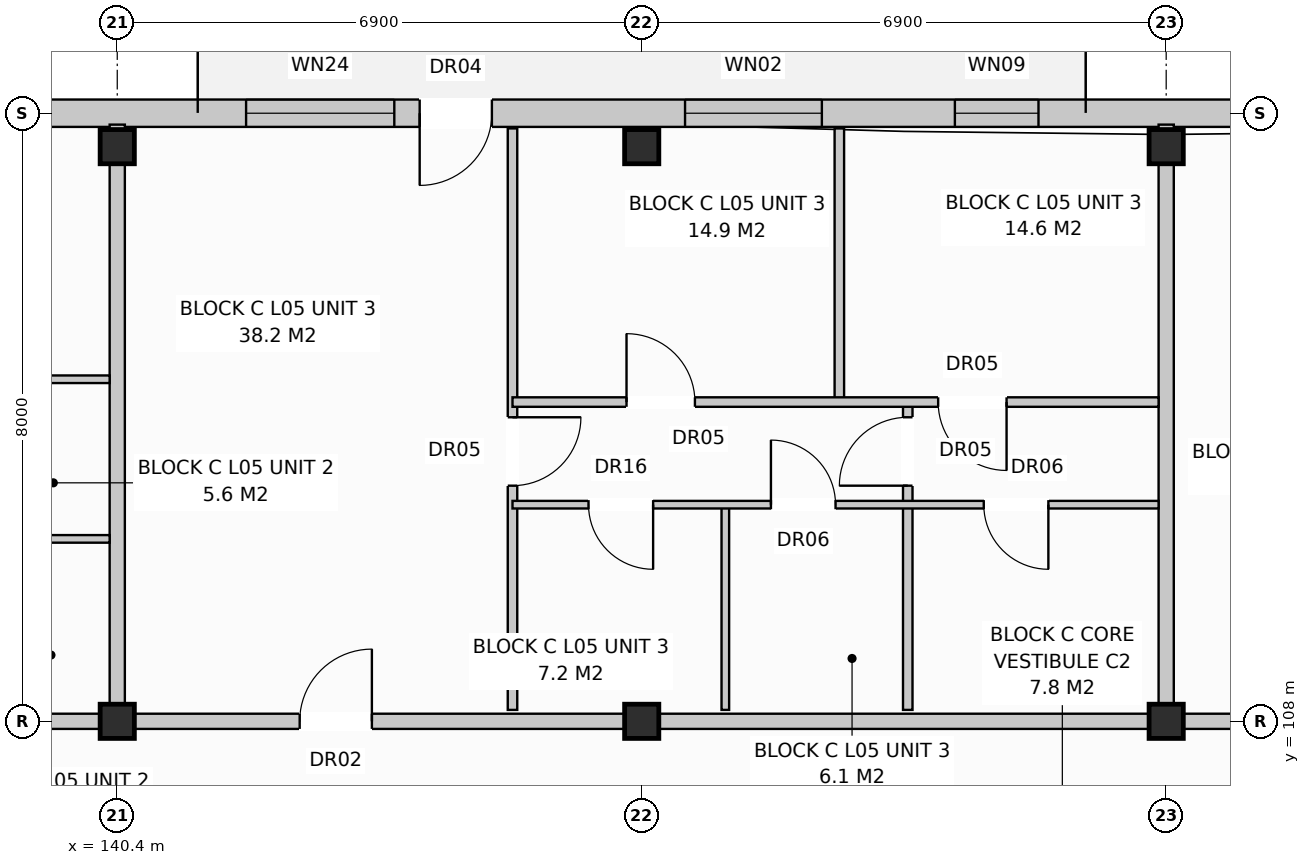
"""IFC4 building model, lengths in metres.
Left out: names, types, materials, properties, quantities, classifications, styles, units other than length and angle.
Written with IfcOpenShell. Run it as: python <this file> out.ifc"""

import sys

from ifc_helpers import new_model, si_unit, direction, frame, frame_2d, origin, origin_with_axes, origin_2d, place, context, subcontext, project, spatial, rectangle, extrude, element, fill, save


model = new_model("IFC4")
c1 = context("Model", 3, precision=1e-05, world=origin(), true_north=direction((0.0, 1.0)))
c2 = subcontext(c1, "Body", "Model", "MODEL_VIEW")
j1 = project(units=[si_unit("LENGTHUNIT", "METRE"), si_unit("PLANEANGLEUNIT", "RADIAN")], contexts=[c1])
p1 = place(None, origin())
s1 = spatial("IfcSite", under=j1, at=p1, CompositionType="ELEMENT")
p2 = place(p1, origin())
s2 = spatial("IfcBuilding", under=s1, at=p2, CompositionType="ELEMENT")
p3 = place(p2, frame((0.0, 0.0, 17.6)))
s3 = spatial("IfcBuildingStorey", under=s2, at=p3, CompositionType="ELEMENT", Elevation=17.6)
for number, where, z_axis, x_axis in (
    (1, (140.4, 108.0, 0.0), (0.0, 0.0, 1.0), (1.0, 0.0, 0.0)),
    (2, (140.4, 115.56, 0.0), (0.0, 0.0, 1.0), (1.0, 0.0, 0.0)),
    (3, (147.3, 108.0, 0.0), (0.0, 0.0, 1.0), (1.0, 0.0, 0.0)),
    (4, (147.3, 115.56, 0.0), (0.0, 0.0, 1.0), (1.0, 0.0, 0.0)),
    (5, (154.2, 108.0, 0.0), (0.0, 0.0, 1.0), (1.0, 0.0, 0.0)),
    (6, (154.2, 115.56, 0.0), (0.0, 0.0, 1.0), (1.0, 0.0, 0.0)),
):
    element("IfcColumn", number, at=place(p3, frame(where, z_axis=z_axis, x_axis=x_axis)), inside=s3, PredefinedType="COLUMN", context=c2, shape_type="SweptSolid", body=[
        extrude(rectangle(XDim=0.45, YDim=0.45, at=origin_2d()), origin(), (0.0, 0.0, 1.0), 3.2),
    ])
p4 = place(p3, frame((112.97, 116.0, 0.0), z_axis=(0.0, 0.0, 1.0), x_axis=(1.0, 0.0, 0.0)))
e7 = element("IfcWall", 7, at=p4, inside=s3, PredefinedType="STANDARD", context=c2, shape_type="SweptSolid", body=[
    extrude(rectangle(XDim=54.86, YDim=0.36, at=frame_2d((27.43, 0.0))), origin(), (0.0, 0.0, 1.0), 2.95),
])
p5 = place(p4, frame((4.891, 0.0, 0.0)))
e8 = element("IfcOpeningElement", 8, at=p5, cuts=e7, PredefinedType="OPENING", context=c2, shape_type="SweptSolid", body=[
    extrude(rectangle(XDim=0.95, YDim=2.1, at=frame_2d((0.475, 1.05))), frame((0.0, 0.192, 0.0), z_axis=(0.0, -1.0, 0.0), x_axis=(1.0, 0.0, 0.0)), (0.0, 0.0, 1.0), 0.384),
])
p6 = place(p4, frame((15.309, 0.0, 0.0)))
e9 = element("IfcOpeningElement", 9, at=p6, cuts=e7, PredefinedType="OPENING", context=c2, shape_type="SweptSolid", body=[
    extrude(rectangle(XDim=0.95, YDim=2.1, at=frame_2d((0.475, 1.05))), frame((0.0, 0.192, 0.0), z_axis=(0.0, -1.0, 0.0), x_axis=(1.0, 0.0, 0.0)), (0.0, 0.0, 1.0), 0.384),
])
p7 = place(p4, frame((31.409, 0.0, 0.0)))
e10 = element("IfcOpeningElement", 10, at=p7, cuts=e7, PredefinedType="OPENING", context=c2, shape_type="SweptSolid", body=[
    extrude(rectangle(XDim=0.95, YDim=2.1, at=frame_2d((0.475, 1.05))), frame((0.0, 0.192, 0.0), z_axis=(0.0, -1.0, 0.0), x_axis=(1.0, 0.0, 0.0)), (0.0, 0.0, 1.0), 0.384),
])
p8 = place(p4, frame((44.309, 0.0, 0.0)))
e11 = element("IfcOpeningElement", 11, at=p8, cuts=e7, PredefinedType="OPENING", context=c2, shape_type="SweptSolid", body=[
    extrude(rectangle(XDim=0.95, YDim=2.1, at=frame_2d((0.475, 1.05))), frame((0.0, 0.192, 0.0), z_axis=(0.0, -1.0, 0.0), x_axis=(1.0, 0.0, 0.0)), (0.0, 0.0, 1.0), 0.384),
])
p9 = place(p4, frame((2.025, 0.0, 0.8)))
e12 = element("IfcOpeningElement", 12, at=p9, cuts=e7, PredefinedType="OPENING", context=c2, shape_type="SweptSolid", body=[
    extrude(rectangle(XDim=1.95, YDim=1.65, at=frame_2d((0.975, 0.825))), frame((0.0, 0.192, 0.0), z_axis=(0.0, -1.0, 0.0), x_axis=(1.0, 0.0, 0.0)), (0.0, 0.0, 1.0), 0.384),
])
p10 = place(p4, frame((8.15, 0.0, 0.72)))
e13 = element("IfcOpeningElement", 13, at=p10, cuts=e7, PredefinedType="OPENING", context=c2, shape_type="SweptSolid", body=[
    extrude(rectangle(XDim=1.1, YDim=1.5, at=frame_2d((0.55, 0.75))), frame((0.0, 0.192, 0.0), z_axis=(0.0, -1.0, 0.0), x_axis=(1.0, 0.0, 0.0)), (0.0, 0.0, 1.0), 0.384),
])
p11 = place(p4, frame((11.675, 0.0, 0.85)))
e14 = element("IfcOpeningElement", 14, at=p11, cuts=e7, PredefinedType="OPENING", context=c2, shape_type="SweptSolid", body=[
    extrude(rectangle(XDim=1.35, YDim=1.6, at=frame_2d((0.675, 0.8))), frame((0.0, 0.192, 0.0), z_axis=(0.0, -1.0, 0.0), x_axis=(1.0, 0.0, 0.0)), (0.0, 0.0, 1.0), 0.384),
])
p12 = place(p4, frame((17.525, 0.0, 0.8)))
e15 = element("IfcOpeningElement", 15, at=p12, cuts=e7, PredefinedType="OPENING", context=c2, shape_type="SweptSolid", body=[
    extrude(rectangle(XDim=1.95, YDim=1.65, at=frame_2d((0.975, 0.825))), frame((0.0, 0.192, 0.0), z_axis=(0.0, -1.0, 0.0), x_axis=(1.0, 0.0, 0.0)), (0.0, 0.0, 1.0), 0.384),
])
p13 = place(p4, frame((21.6, 0.0, 0.8)))
e16 = element("IfcOpeningElement", 16, at=p13, cuts=e7, PredefinedType="OPENING", context=c2, shape_type="SweptSolid", body=[
    extrude(rectangle(XDim=1.8, YDim=1.7, at=frame_2d((0.9, 0.85))), frame((0.0, 0.192, 0.0), z_axis=(0.0, -1.0, 0.0), x_axis=(1.0, 0.0, 0.0)), (0.0, 0.0, 1.0), 0.384),
])
p14 = place(p4, frame((25.35, 0.0, 0.72)))
e17 = element("IfcOpeningElement", 17, at=p14, cuts=e7, PredefinedType="OPENING", context=c2, shape_type="SweptSolid", body=[
    extrude(rectangle(XDim=1.1, YDim=1.5, at=frame_2d((0.55, 0.75))), frame((0.0, 0.192, 0.0), z_axis=(0.0, -1.0, 0.0), x_axis=(1.0, 0.0, 0.0)), (0.0, 0.0, 1.0), 0.384),
])
p15 = place(p4, frame((29.125, 0.0, 0.8)))
e18 = element("IfcOpeningElement", 18, at=p15, cuts=e7, PredefinedType="OPENING", context=c2, shape_type="SweptSolid", body=[
    extrude(rectangle(XDim=1.95, YDim=1.65, at=frame_2d((0.975, 0.825))), frame((0.0, 0.192, 0.0), z_axis=(0.0, -1.0, 0.0), x_axis=(1.0, 0.0, 0.0)), (0.0, 0.0, 1.0), 0.384),
])
p16 = place(p4, frame((34.9, 0.0, 0.8)))
e19 = element("IfcOpeningElement", 19, at=p16, cuts=e7, PredefinedType="OPENING", context=c2, shape_type="SweptSolid", body=[
    extrude(rectangle(XDim=1.8, YDim=1.7, at=frame_2d((0.9, 0.85))), frame((0.0, 0.192, 0.0), z_axis=(0.0, -1.0, 0.0), x_axis=(1.0, 0.0, 0.0)), (0.0, 0.0, 1.0), 0.384),
])
p17 = place(p4, frame((38.45, 0.0, 0.72)))
e20 = element("IfcOpeningElement", 20, at=p17, cuts=e7, PredefinedType="OPENING", context=c2, shape_type="SweptSolid", body=[
    extrude(rectangle(XDim=1.1, YDim=1.5, at=frame_2d((0.55, 0.75))), frame((0.0, 0.192, 0.0), z_axis=(0.0, -1.0, 0.0), x_axis=(1.0, 0.0, 0.0)), (0.0, 0.0, 1.0), 0.384),
])
p18 = place(p4, frame((42.55, 0.0, 0.72)))
e21 = element("IfcOpeningElement", 21, at=p18, cuts=e7, PredefinedType="OPENING", context=c2, shape_type="SweptSolid", body=[
    extrude(rectangle(XDim=1.1, YDim=1.5, at=frame_2d((0.55, 0.75))), frame((0.0, 0.192, 0.0), z_axis=(0.0, -1.0, 0.0), x_axis=(1.0, 0.0, 0.0)), (0.0, 0.0, 1.0), 0.384),
])
p19 = place(p4, frame((45.8, 0.0, 0.8)))
e22 = element("IfcOpeningElement", 22, at=p19, cuts=e7, PredefinedType="OPENING", context=c2, shape_type="SweptSolid", body=[
    extrude(rectangle(XDim=1.8, YDim=1.7, at=frame_2d((0.9, 0.85))), frame((0.0, 0.192, 0.0), z_axis=(0.0, -1.0, 0.0), x_axis=(1.0, 0.0, 0.0)), (0.0, 0.0, 1.0), 0.384),
])
p20 = place(p4, frame((49.15, 0.0, 0.72)))
e23 = element("IfcOpeningElement", 23, at=p20, cuts=e7, PredefinedType="OPENING", context=c2, shape_type="SweptSolid", body=[
    extrude(rectangle(XDim=1.9, YDim=1.85, at=frame_2d((0.95, 0.925))), frame((0.0, 0.192, 0.0), z_axis=(0.0, -1.0, 0.0), x_axis=(1.0, 0.0, 0.0)), (0.0, 0.0, 1.0), 0.384),
])
p21 = place(p4, frame((52.95, 0.0, 0.72)))
e24 = element("IfcOpeningElement", 24, at=p21, cuts=e7, PredefinedType="OPENING", context=c2, shape_type="SweptSolid", body=[
    extrude(rectangle(XDim=1.1, YDim=1.5, at=frame_2d((0.55, 0.75))), frame((0.0, 0.192, 0.0), z_axis=(0.0, -1.0, 0.0), x_axis=(1.0, 0.0, 0.0)), (0.0, 0.0, 1.0), 0.384),
])
p22 = place(p3, frame((140.4, 108.15, 0.0), z_axis=(0.0, 0.0, 1.0), x_axis=(0.0, 1.0, 0.0)))
e25 = element("IfcWall", 25, at=p22, inside=s3, PredefinedType="PARTITIONING", context=c2, shape_type="SweptSolid", body=[
    extrude(rectangle(XDim=7.7, YDim=0.2, at=frame_2d((3.85, 0.0))), origin(), (0.0, 0.0, 1.0), 2.95),
])
p23 = place(p3, frame((133.5, 108.0, 0.0), z_axis=(0.0, 0.0, 1.0), x_axis=(1.0, 0.0, 0.0)))
e26 = element("IfcWall", 26, at=p23, inside=s3, PredefinedType="PARTITIONING", context=c2, shape_type="SweptSolid", body=[
    extrude(rectangle(XDim=6.9, YDim=0.2, at=frame_2d((3.45, 0.0))), origin(), (0.0, 0.0, 1.0), 2.39),
])
p24 = place(p23, frame((2.0, 0.0, 0.0)))
e27 = element("IfcOpeningElement", 27, at=p24, cuts=e26, PredefinedType="OPENING", context=c2, shape_type="SweptSolid", body=[
    extrude(rectangle(XDim=0.95, YDim=2.15, at=frame_2d((0.475, 1.075))), frame((0.0, 0.112, 0.0), z_axis=(0.0, -1.0, 0.0), x_axis=(1.0, 0.0, 0.0)), (0.0, 0.0, 1.0), 0.224),
])
for number, where, z_axis, x_axis in (
    (28, (137.4, 110.4, 0.0), (0.0, 0.0, 1.0), (1.0, 0.0, 0.0)),
    (29, (137.4, 112.5, 0.0), (0.0, 0.0, 1.0), (1.0, 0.0, 0.0)),
):
    element("IfcWall", number, at=place(p3, frame(where, z_axis=z_axis, x_axis=x_axis)), inside=s3, PredefinedType="PARTITIONING", context=c2, shape_type="SweptSolid", body=[
        extrude(rectangle(XDim=2.9, YDim=0.1, at=frame_2d((1.45, 0.0))), origin(), (0.0, 0.0, 1.0), 2.95),
    ])
p25 = place(p3, frame((154.2, 108.15, 0.0), z_axis=(0.0, 0.0, 1.0), x_axis=(0.0, 1.0, 0.0)))
e30 = element("IfcWall", 30, at=p25, inside=s3, PredefinedType="PARTITIONING", context=c2, shape_type="SweptSolid", body=[
    extrude(rectangle(XDim=7.7, YDim=0.2, at=frame_2d((3.85, 0.0))), origin(), (0.0, 0.0, 1.0), 2.95),
])
p26 = place(p3, frame((140.4, 108.0, 0.0), z_axis=(0.0, 0.0, 1.0), x_axis=(1.0, 0.0, 0.0)))
e31 = element("IfcWall", 31, at=p26, inside=s3, PredefinedType="PARTITIONING", context=c2, shape_type="SweptSolid", body=[
    extrude(rectangle(XDim=13.8, YDim=0.2, at=frame_2d((6.9, 0.0))), origin(), (0.0, 0.0, 1.0), 2.39),
])
p27 = place(p26, frame((2.4, 0.0, 0.0)))
e32 = element("IfcOpeningElement", 32, at=p27, cuts=e31, PredefinedType="OPENING", context=c2, shape_type="SweptSolid", body=[
    extrude(rectangle(XDim=0.95, YDim=2.15, at=frame_2d((0.475, 1.075))), frame((0.0, 0.112, 0.0), z_axis=(0.0, -1.0, 0.0), x_axis=(1.0, 0.0, 0.0)), (0.0, 0.0, 1.0), 0.224),
])
p28 = place(p3, frame((145.6, 108.15, 0.0), z_axis=(0.0, 0.0, 1.0), x_axis=(0.0, 1.0, 0.0)))
e33 = element("IfcWall", 33, at=p28, inside=s3, PredefinedType="PARTITIONING", context=c2, shape_type="SweptSolid", body=[
    extrude(rectangle(XDim=7.65, YDim=0.125, at=frame_2d((3.825, 0.0))), origin(), (0.0, 0.0, 1.0), 2.95),
])
p29 = place(p28, frame((2.95, 0.0, 0.0)))
e34 = element("IfcOpeningElement", 34, at=p29, cuts=e33, PredefinedType="OPENING", context=c2, shape_type="SweptSolid", body=[
    extrude(rectangle(XDim=0.9, YDim=2.1, at=frame_2d((0.45, 1.05))), frame((0.0, 0.074, 0.0), z_axis=(0.0, -1.0, 0.0), x_axis=(1.0, 0.0, 0.0)), (0.0, 0.0, 1.0), 0.149),
])
p30 = place(p3, frame((148.4, 108.15, 0.0), z_axis=(0.0, 0.0, 1.0), x_axis=(0.0, 1.0, 0.0)))
e35 = element("IfcWall", 35, at=p30, inside=s3, PredefinedType="PARTITIONING", context=c2, shape_type="SweptSolid", body=[
    extrude(rectangle(XDim=2.7, YDim=0.1, at=frame_2d((1.35, 0.0))), origin(), (0.0, 0.0, 1.0), 2.95),
])
p31 = place(p3, frame((150.8, 108.15, 0.0), z_axis=(0.0, 0.0, 1.0), x_axis=(0.0, 1.0, 0.0)))
e36 = element("IfcWall", 36, at=p31, inside=s3, PredefinedType="PARTITIONING", context=c2, shape_type="SweptSolid", body=[
    extrude(rectangle(XDim=4.05, YDim=0.125, at=frame_2d((2.025, 0.0))), origin(), (0.0, 0.0, 1.0), 2.95),
])
p32 = place(p31, frame((2.95, 0.0, 0.0)))
e37 = element("IfcOpeningElement", 37, at=p32, cuts=e36, PredefinedType="OPENING", context=c2, shape_type="SweptSolid", body=[
    extrude(rectangle(XDim=0.9, YDim=2.1, at=frame_2d((0.45, 1.05))), frame((0.0, 0.074, 0.0), z_axis=(0.0, -1.0, 0.0), x_axis=(1.0, 0.0, 0.0)), (0.0, 0.0, 1.0), 0.149),
])
p33 = place(p3, frame((149.9, 112.2, 0.0), z_axis=(0.0, 0.0, 1.0), x_axis=(0.0, 1.0, 0.0)))
e38 = element("IfcWall", 38, at=p33, inside=s3, PredefinedType="PARTITIONING", context=c2, shape_type="SweptSolid", body=[
    extrude(rectangle(XDim=3.6, YDim=0.125, at=frame_2d((1.8, 0.0))), origin(), (0.0, 0.0, 1.0), 2.95),
])
p34 = place(p3, frame((145.6, 110.85, 0.0), z_axis=(0.0, 0.0, 1.0), x_axis=(1.0, 0.0, 0.0)))
e39 = element("IfcWall", 39, at=p34, inside=s3, PredefinedType="PARTITIONING", context=c2, shape_type="SweptSolid", body=[
    extrude(rectangle(XDim=8.5, YDim=0.1, at=frame_2d((4.25, 0.0))), origin(), (0.0, 0.0, 1.0), 2.95),
])
p35 = place(p34, frame((1.0, 0.0, 0.0)))
e40 = element("IfcOpeningElement", 40, at=p35, cuts=e39, PredefinedType="OPENING", context=c2, shape_type="SweptSolid", body=[
    extrude(rectangle(XDim=0.85, YDim=2.1, at=frame_2d((0.425, 1.05))), frame((0.0, 0.062, 0.0), z_axis=(0.0, -1.0, 0.0), x_axis=(1.0, 0.0, 0.0)), (0.0, 0.0, 1.0), 0.124),
])
p36 = place(p34, frame((3.4, 0.0, 0.0)))
e41 = element("IfcOpeningElement", 41, at=p36, cuts=e39, PredefinedType="OPENING", context=c2, shape_type="SweptSolid", body=[
    extrude(rectangle(XDim=0.85, YDim=2.05, at=frame_2d((0.425, 1.025))), frame((0.0, 0.062, 0.0), z_axis=(0.0, -1.0, 0.0), x_axis=(1.0, 0.0, 0.0)), (0.0, 0.0, 1.0), 0.124),
])
p37 = place(p34, frame((6.2, 0.0, 0.0)))
e42 = element("IfcOpeningElement", 42, at=p37, cuts=e39, PredefinedType="OPENING", context=c2, shape_type="SweptSolid", body=[
    extrude(rectangle(XDim=0.85, YDim=2.05, at=frame_2d((0.425, 1.025))), frame((0.0, 0.062, 0.0), z_axis=(0.0, -1.0, 0.0), x_axis=(1.0, 0.0, 0.0)), (0.0, 0.0, 1.0), 0.124),
])
p38 = place(p3, frame((145.6, 112.2, 0.0), z_axis=(0.0, 0.0, 1.0), x_axis=(1.0, 0.0, 0.0)))
e43 = element("IfcWall", 43, at=p38, inside=s3, PredefinedType="PARTITIONING", context=c2, shape_type="SweptSolid", body=[
    extrude(rectangle(XDim=8.5, YDim=0.125, at=frame_2d((4.25, 0.0))), origin(), (0.0, 0.0, 1.0), 2.95),
])
p39 = place(p38, frame((1.5, 0.0, 0.0)))
e44 = element("IfcOpeningElement", 44, at=p39, cuts=e43, PredefinedType="OPENING", context=c2, shape_type="SweptSolid", body=[
    extrude(rectangle(XDim=0.9, YDim=2.1, at=frame_2d((0.45, 1.05))), frame((0.0, 0.074, 0.0), z_axis=(0.0, -1.0, 0.0), x_axis=(1.0, 0.0, 0.0)), (0.0, 0.0, 1.0), 0.149),
])
p40 = place(p38, frame((5.6, 0.0, 0.0)))
e45 = element("IfcOpeningElement", 45, at=p40, cuts=e43, PredefinedType="OPENING", context=c2, shape_type="SweptSolid", body=[
    extrude(rectangle(XDim=0.9, YDim=2.1, at=frame_2d((0.45, 1.05))), frame((0.0, 0.074, 0.0), z_axis=(0.0, -1.0, 0.0), x_axis=(1.0, 0.0, 0.0)), (0.0, 0.0, 1.0), 0.149),
])
p41 = place(p3, frame((154.2, 108.0, 0.0), z_axis=(0.0, 0.0, 1.0), x_axis=(1.0, 0.0, 0.0)))
e46 = element("IfcWall", 46, at=p41, inside=s3, PredefinedType="PARTITIONING", context=c2, shape_type="SweptSolid", body=[
    extrude(rectangle(XDim=6.9, YDim=0.2, at=frame_2d((3.45, 0.0))), origin(), (0.0, 0.0, 1.0), 2.39),
])
p42 = place(p41, frame((2.0, 0.0, 0.0)))
e47 = element("IfcOpeningElement", 47, at=p42, cuts=e46, PredefinedType="OPENING", context=c2, shape_type="SweptSolid", body=[
    extrude(rectangle(XDim=0.95, YDim=2.15, at=frame_2d((0.475, 1.075))), frame((0.0, 0.112, 0.0), z_axis=(0.0, -1.0, 0.0), x_axis=(1.0, 0.0, 0.0)), (0.0, 0.0, 1.0), 0.224),
])
p43 = place(p7, frame((0.95, 0.0, 0.0), z_axis=(0.0, 0.0, 1.0), x_axis=(-1.0, 0.0, 0.0)))
e48 = element("IfcDoor", 48, at=p43, inside=s3, OperationType="SINGLE_SWING_LEFT", PredefinedType="DOOR", context=c2, shape_type="SweptSolid", body=[
    extrude(rectangle(XDim=0.95, YDim=2.1, at=frame_2d((0.475, 1.05))), frame((0.0, 0.025, 0.0), z_axis=(0.0, -1.0, 0.0), x_axis=(1.0, 0.0, 0.0)), (0.0, 0.0, 1.0), 0.05),
])
fill(e10, e48)
p44 = place(p15, origin_with_axes())
e49 = element("IfcWindow", 49, at=p44, inside=s3, PartitioningType="SINGLE_PANEL", PredefinedType="WINDOW", context=c2, shape_type="SweptSolid", body=[
    extrude(rectangle(XDim=1.95, YDim=1.65, at=frame_2d((0.975, 0.825))), frame((0.0, 0.03, 0.0), z_axis=(0.0, -1.0, 0.0), x_axis=(1.0, 0.0, 0.0)), (0.0, 0.0, 1.0), 0.06),
])
fill(e18, e49)
p45 = place(p16, origin_with_axes())
e50 = element("IfcWindow", 50, at=p45, inside=s3, PartitioningType="SINGLE_PANEL", PredefinedType="WINDOW", context=c2, shape_type="SweptSolid", body=[
    extrude(rectangle(XDim=1.8, YDim=1.7, at=frame_2d((0.9, 0.85))), frame((0.0, 0.03, 0.0), z_axis=(0.0, -1.0, 0.0), x_axis=(1.0, 0.0, 0.0)), (0.0, 0.0, 1.0), 0.06),
])
fill(e19, e50)
p46 = place(p17, origin_with_axes())
e51 = element("IfcWindow", 51, at=p46, inside=s3, PartitioningType="SINGLE_PANEL", PredefinedType="WINDOW", context=c2, shape_type="SweptSolid", body=[
    extrude(rectangle(XDim=1.1, YDim=1.5, at=frame_2d((0.55, 0.75))), frame((0.0, 0.03, 0.0), z_axis=(0.0, -1.0, 0.0), x_axis=(1.0, 0.0, 0.0)), (0.0, 0.0, 1.0), 0.06),
])
fill(e20, e51)
p47 = place(p27, origin_with_axes())
e52 = element("IfcDoor", 52, at=p47, inside=s3, OperationType="SINGLE_SWING_RIGHT", PredefinedType="DOOR", context=c2, shape_type="SweptSolid", body=[
    extrude(rectangle(XDim=0.95, YDim=2.15, at=frame_2d((0.475, 1.075))), frame((0.0, 0.025, 0.0), z_axis=(0.0, -1.0, 0.0), x_axis=(1.0, 0.0, 0.0)), (0.0, 0.0, 1.0), 0.05),
])
fill(e32, e52)
p48 = place(p29, frame((0.9, 0.0, 0.0), z_axis=(0.0, 0.0, 1.0), x_axis=(-1.0, 0.0, 0.0)))
e53 = element("IfcDoor", 53, at=p48, inside=s3, OperationType="SINGLE_SWING_RIGHT", PredefinedType="DOOR", context=c2, shape_type="SweptSolid", body=[
    extrude(rectangle(XDim=0.9, YDim=2.1, at=frame_2d((0.45, 1.05))), frame((0.0, 0.025, 0.0), z_axis=(0.0, -1.0, 0.0), x_axis=(1.0, 0.0, 0.0)), (0.0, 0.0, 1.0), 0.05),
])
fill(e34, e53)
p49 = place(p32, origin_with_axes())
e54 = element("IfcDoor", 54, at=p49, inside=s3, OperationType="SINGLE_SWING_LEFT", PredefinedType="DOOR", context=c2, shape_type="SweptSolid", body=[
    extrude(rectangle(XDim=0.9, YDim=2.1, at=frame_2d((0.45, 1.05))), frame((0.0, 0.025, 0.0), z_axis=(0.0, -1.0, 0.0), x_axis=(1.0, 0.0, 0.0)), (0.0, 0.0, 1.0), 0.05),
])
fill(e37, e54)
p50 = place(p35, frame((0.85, 0.0, 0.0), z_axis=(0.0, 0.0, 1.0), x_axis=(-1.0, 0.0, 0.0)))
e55 = element("IfcDoor", 55, at=p50, inside=s3, OperationType="SINGLE_SWING_RIGHT", PredefinedType="DOOR", context=c2, shape_type="SweptSolid", body=[
    extrude(rectangle(XDim=0.85, YDim=2.1, at=frame_2d((0.425, 1.05))), frame((0.0, 0.025, 0.0), z_axis=(0.0, -1.0, 0.0), x_axis=(1.0, 0.0, 0.0)), (0.0, 0.0, 1.0), 0.05),
])
fill(e40, e55)
p51 = place(p36, origin_with_axes())
e56 = element("IfcDoor", 56, at=p51, inside=s3, OperationType="SINGLE_SWING_LEFT", PredefinedType="DOOR", context=c2, shape_type="SweptSolid", body=[
    extrude(rectangle(XDim=0.85, YDim=2.05, at=frame_2d((0.425, 1.025))), frame((0.0, 0.025, 0.0), z_axis=(0.0, -1.0, 0.0), x_axis=(1.0, 0.0, 0.0)), (0.0, 0.0, 1.0), 0.05),
])
fill(e41, e56)
p52 = place(p37, frame((0.85, 0.0, 0.0), z_axis=(0.0, 0.0, 1.0), x_axis=(-1.0, 0.0, 0.0)))
e57 = element("IfcDoor", 57, at=p52, inside=s3, OperationType="SINGLE_SWING_RIGHT", PredefinedType="DOOR", context=c2, shape_type="SweptSolid", body=[
    extrude(rectangle(XDim=0.85, YDim=2.05, at=frame_2d((0.425, 1.025))), frame((0.0, 0.025, 0.0), z_axis=(0.0, -1.0, 0.0), x_axis=(1.0, 0.0, 0.0)), (0.0, 0.0, 1.0), 0.05),
])
fill(e42, e57)
p53 = place(p39, origin_with_axes())
e58 = element("IfcDoor", 58, at=p53, inside=s3, OperationType="SINGLE_SWING_LEFT", PredefinedType="DOOR", context=c2, shape_type="SweptSolid", body=[
    extrude(rectangle(XDim=0.9, YDim=2.1, at=frame_2d((0.45, 1.05))), frame((0.0, 0.025, 0.0), z_axis=(0.0, -1.0, 0.0), x_axis=(1.0, 0.0, 0.0)), (0.0, 0.0, 1.0), 0.05),
])
fill(e44, e58)
p54 = place(p40, frame((0.9, 0.0, 0.0), z_axis=(0.0, 0.0, 1.0), x_axis=(-1.0, 0.0, 0.0)))
e59 = element("IfcDoor", 59, at=p54, inside=s3, OperationType="SINGLE_SWING_RIGHT", PredefinedType="DOOR", context=c2, shape_type="SweptSolid", body=[
    extrude(rectangle(XDim=0.9, YDim=2.1, at=frame_2d((0.45, 1.05))), frame((0.0, 0.025, 0.0), z_axis=(0.0, -1.0, 0.0), x_axis=(1.0, 0.0, 0.0)), (0.0, 0.0, 1.0), 0.05),
])
fill(e45, e59)
save(model, sys.argv[1])
